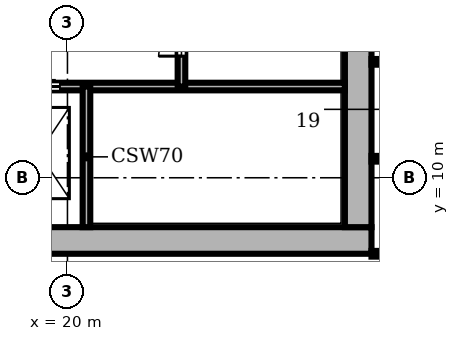
"""IFC4 building model, lengths in metres.
Left out: names, types, materials, properties, quantities, classifications, styles, units other than length and angle.
Written with IfcOpenShell. Run it as: python <this file> out.ifc"""

import sys

from ifc_helpers import new_model, si_unit, direction, frame, frame_2d, origin, place, context, subcontext, project, spatial, rectangle, extrude, element, fill, save


model = new_model("IFC4")
c1 = context("Model", 3, precision=1e-05, world=origin(), true_north=direction((0.0, 1.0)))
c2 = subcontext(c1, "Body", "Model", "MODEL_VIEW")
j1 = project(units=[si_unit("LENGTHUNIT", "METRE"), si_unit("PLANEANGLEUNIT", "RADIAN")], contexts=[c1])
p1 = place(None, origin())
s1 = spatial("IfcSite", under=j1, at=p1, CompositionType="ELEMENT")
p2 = place(p1, origin())
s2 = spatial("IfcBuilding", under=s1, at=p2, CompositionType="ELEMENT")
p3 = place(p2, frame((0.0, 0.0, 178.5)))
s3 = spatial("IfcBuildingStorey", under=s2, at=p3, CompositionType="ELEMENT", Elevation=178.5)
p4 = place(p3, frame((8.0, 8.35, 0.0), z_axis=(0.0, 0.0, 1.0), x_axis=(1.0, 0.0, 0.0)))
e1 = element("IfcWall", 1, at=p4, inside=s3, PredefinedType="SHEAR", context=c2, shape_type="SweptSolid", body=[
    extrude(rectangle(XDim=20.0, YDim=0.7, at=frame_2d((10.0, 0.0))), origin(), (0.0, 0.0, 1.0), 3.9),
])
p5 = place(p3, frame((27.65, 8.7, 0.0), z_axis=(0.0, 0.0, 1.0), x_axis=(0.0, 1.0, 0.0)))
e2 = element("IfcWall", 2, at=p5, inside=s3, PredefinedType="SHEAR", context=c2, shape_type="SweptSolid", body=[
    extrude(rectangle(XDim=18.6, YDim=0.7, at=frame_2d((9.3, 0.0))), origin(), (0.0, 0.0, 1.0), 3.9),
])
p6 = place(p5, frame((4.75, 0.0, 0.0)))
e3 = element("IfcOpeningElement", 3, at=p6, cuts=e2, PredefinedType="OPENING", context=c2, shape_type="SweptSolid", body=[
    extrude(rectangle(XDim=1.6, YDim=2.1, at=frame_2d((0.8, 1.05))), frame((0.0, 0.36, 0.0), z_axis=(0.0, -1.0, 0.0), x_axis=(1.0, 0.0, 0.0)), (0.0, 0.0, 1.0), 0.72),
])
p7 = place(p3, frame((13.8, 12.4, 0.0), z_axis=(0.0, 0.0, 1.0), x_axis=(1.0, 0.0, 0.0)))
e4 = element("IfcWall", 4, at=p7, inside=s3, PredefinedType="SHEAR", context=c2, shape_type="SweptSolid", body=[
    extrude(rectangle(XDim=13.5, YDim=0.2, at=frame_2d((6.75, 0.0))), origin(), (0.0, 0.0, 1.0), 3.58),
])
p8 = place(p7, frame((2.4, 0.0, 0.0)))
e5 = element("IfcOpeningElement", 5, at=p8, cuts=e4, PredefinedType="OPENING", context=c2, shape_type="SweptSolid", body=[
    extrude(rectangle(XDim=1.1, YDim=2.1, at=frame_2d((0.55, 1.05))), frame((0.0, 0.11, 0.0), z_axis=(0.0, -1.0, 0.0), x_axis=(1.0, 0.0, 0.0)), (0.0, 0.0, 1.0), 0.22),
])
p9 = place(p7, frame((4.9, 0.0, 0.0)))
e6 = element("IfcOpeningElement", 6, at=p9, cuts=e4, PredefinedType="OPENING", context=c2, shape_type="SweptSolid", body=[
    extrude(rectangle(XDim=1.1, YDim=2.1, at=frame_2d((0.55, 1.05))), frame((0.0, 0.11, 0.0), z_axis=(0.0, -1.0, 0.0), x_axis=(1.0, 0.0, 0.0)), (0.0, 0.0, 1.0), 0.22),
])
p10 = place(p7, frame((0.2, 0.0, 0.0)))
e7 = element("IfcOpeningElement", 7, at=p10, cuts=e4, PredefinedType="OPENING", context=c2, shape_type="SweptSolid", body=[
    extrude(rectangle(XDim=1.0, YDim=2.1, at=frame_2d((0.5, 1.05))), frame((0.0, 0.11, 0.0), z_axis=(0.0, -1.0, 0.0), x_axis=(1.0, 0.0, 0.0)), (0.0, 0.0, 1.0), 0.22),
])
p11 = place(p3, frame((20.5, 8.7, 0.0), z_axis=(0.0, 0.0, 1.0), x_axis=(0.0, 1.0, 0.0)))
e8 = element("IfcWall", 8, at=p11, inside=s3, PredefinedType="SHEAR", context=c2, shape_type="SweptSolid", body=[
    extrude(rectangle(XDim=3.7, YDim=0.2, at=frame_2d((1.85, 0.0))), origin(), (0.0, 0.0, 1.0), 3.58),
])
p12 = place(p3, frame((23.0, 12.4, 0.0), z_axis=(0.0, 0.0, 1.0), x_axis=(0.0, 1.0, 0.0)))
e9 = element("IfcWall", 9, at=p12, inside=s3, PredefinedType="SHEAR", context=c2, shape_type="SweptSolid", body=[
    extrude(rectangle(XDim=2.8, YDim=0.2, at=frame_2d((1.4, 0.0))), origin(), (0.0, 0.0, 1.0), 3.58),
])
p13 = place(p12, frame((0.8, 0.0, 0.0)))
e10 = element("IfcOpeningElement", 10, at=p13, cuts=e9, PredefinedType="OPENING", context=c2, shape_type="SweptSolid", body=[
    extrude(rectangle(XDim=1.2, YDim=2.1, at=frame_2d((0.6, 1.05))), frame((0.0, 0.11, 0.0), z_axis=(0.0, -1.0, 0.0), x_axis=(1.0, 0.0, 0.0)), (0.0, 0.0, 1.0), 0.22),
])
p14 = place(p3, frame((28.0, 8.0, 0.0), z_axis=(0.0, 0.0, 1.0), x_axis=(1.0, 0.0, 0.0)))
e11 = element("IfcWall", 11, at=p14, inside=s3, PredefinedType="PARTITIONING", context=c2, shape_type="SweptSolid", body=[
    extrude(rectangle(XDim=2.8, YDim=0.15, at=frame_2d((1.4, 0.0))), origin(), (0.0, 0.0, 1.0), 3.58),
])
p15 = place(p14, frame((0.85, 0.0, 0.0)))
e12 = element("IfcOpeningElement", 12, at=p15, cuts=e11, PredefinedType="OPENING", context=c2, shape_type="SweptSolid", body=[
    extrude(rectangle(XDim=1.0, YDim=2.1, at=frame_2d((0.5, 1.05))), frame((0.0, 0.085, 0.0), z_axis=(0.0, -1.0, 0.0), x_axis=(1.0, 0.0, 0.0)), (0.0, 0.0, 1.0), 0.17),
])
p16 = place(p3, frame((28.0, 10.5, 0.0), z_axis=(0.0, 0.0, 1.0), x_axis=(1.0, 0.0, 0.0)))
e13 = element("IfcWall", 13, at=p16, inside=s3, PredefinedType="PARTITIONING", context=c2, shape_type="SweptSolid", body=[
    extrude(rectangle(XDim=1.35, YDim=0.15, at=frame_2d((0.675, 0.0))), origin(), (0.0, 0.0, 1.0), 3.58),
])
p17 = place(p3, frame((28.0, 13.05, 0.0), z_axis=(0.0, 0.0, 1.0), x_axis=(1.0, 0.0, 0.0)))
e14 = element("IfcWall", 14, at=p17, inside=s3, PredefinedType="PARTITIONING", context=c2, shape_type="SweptSolid", body=[
    extrude(rectangle(XDim=2.8, YDim=0.15, at=frame_2d((1.4, 0.0))), origin(), (0.0, 0.0, 1.0), 3.58),
])
p18 = place(p17, frame((0.85, 0.0, 0.0)))
e15 = element("IfcOpeningElement", 15, at=p18, cuts=e14, PredefinedType="OPENING", context=c2, shape_type="SweptSolid", body=[
    extrude(rectangle(XDim=1.0, YDim=2.1, at=frame_2d((0.5, 1.05))), frame((0.0, 0.085, 0.0), z_axis=(0.0, -1.0, 0.0), x_axis=(1.0, 0.0, 0.0)), (0.0, 0.0, 1.0), 0.17),
])
p19 = place(p9, origin())
e16 = element("IfcDoor", 16, at=p19, inside=s3, OperationType="DOUBLE_DOOR_SLIDING", PredefinedType="DOOR", context=c2, shape_type="SweptSolid", body=[
    extrude(rectangle(XDim=1.1, YDim=2.1, at=frame_2d((0.55, 1.05))), frame((0.0, 0.025, 0.0), z_axis=(0.0, -1.0, 0.0), x_axis=(1.0, 0.0, 0.0)), (0.0, 0.0, 1.0), 0.05),
])
fill(e6, e16)
p20 = place(p13, origin())
e17 = element("IfcDoor", 17, at=p20, inside=s3, OperationType="DOUBLE_DOOR_SINGLE_SWING", PredefinedType="DOOR", context=c2, shape_type="SweptSolid", body=[
    extrude(rectangle(XDim=1.2, YDim=2.1, at=frame_2d((0.6, 1.05))), frame((0.0, 0.025, 0.0), z_axis=(0.0, -1.0, 0.0), x_axis=(1.0, 0.0, 0.0)), (0.0, 0.0, 1.0), 0.05),
])
fill(e10, e17)
save(model, sys.argv[1])
